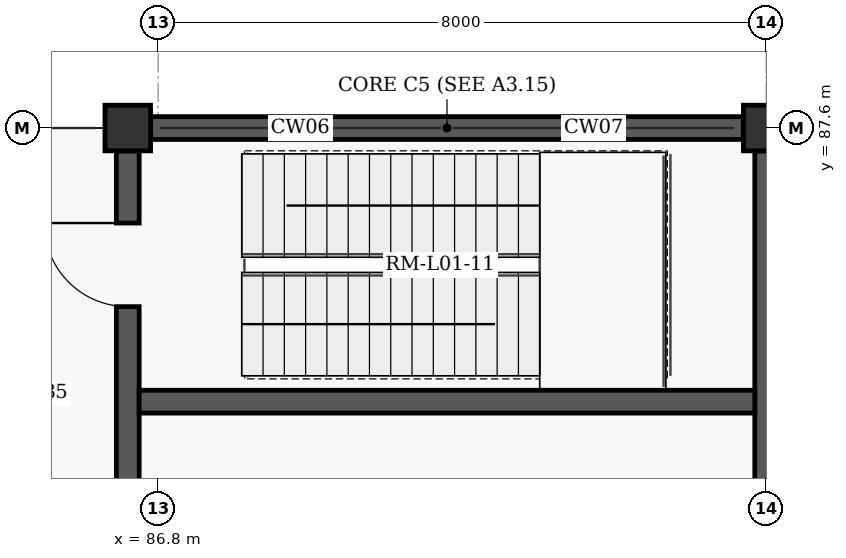
"""IFC4 building model, lengths in metres.
Left out: names, types, materials, properties, quantities, classifications, styles, units other than length and angle.
Written with IfcOpenShell. Run it as: python <this file> out.ifc"""

import sys

from ifc_helpers import new_model, si_unit, direction, frame, frame_2d, origin, origin_2d, place, context, subcontext, project, spatial, rectangle, extrude, element, fill, save


model = new_model("IFC4")
c1 = context("Model", 3, precision=1e-05, world=origin(), true_north=direction((0.0, 1.0)))
c2 = subcontext(c1, "Body", "Model", "MODEL_VIEW")
j1 = project(units=[si_unit("LENGTHUNIT", "METRE"), si_unit("PLANEANGLEUNIT", "RADIAN")], contexts=[c1])
p1 = place(None, origin())
s1 = spatial("IfcSite", under=j1, at=p1, CompositionType="ELEMENT")
p2 = place(p1, origin())
s2 = spatial("IfcBuilding", under=s1, at=p2, CompositionType="ELEMENT")
p3 = place(p2, frame((0.0, 0.0, 5.4)))
s3 = spatial("IfcBuildingStorey", under=s2, at=p3, CompositionType="ELEMENT", Elevation=5.4)
for number, where, z_axis, x_axis in (
    (1, (86.4, 87.6, 0.0), (0.0, 0.0, 1.0), (1.0, 0.0, 0.0)),
    (2, (94.8, 87.6, 0.0), (0.0, 0.0, 1.0), (1.0, 0.0, 0.0)),
):
    element("IfcColumn", number, at=place(p3, frame(where, z_axis=z_axis, x_axis=x_axis)), inside=s3, PredefinedType="COLUMN", context=c2, shape_type="SweptSolid", body=[
        extrude(rectangle(XDim=0.6, YDim=0.6, at=origin_2d()), origin(), (0.0, 0.0, 1.0), 4.8),
    ])
p4 = place(p3, frame((86.702, 87.6, 0.0), z_axis=(0.0, 0.0, 1.0), x_axis=(1.0, 0.0, 0.0)))
e3 = element("IfcWall", 3, at=p4, inside=s3, PredefinedType="SHEAR", context=c2, shape_type="SweptSolid", body=[
    extrude(rectangle(XDim=7.796, YDim=0.3, at=frame_2d((3.898, 0.0))), origin(), (0.0, 0.0, 1.0), 4.54),
])
p5 = place(p3, frame((86.4, 79.902, 0.0), z_axis=(0.0, 0.0, 1.0), x_axis=(0.0, 1.0, 0.0)))
e4 = element("IfcWall", 4, at=p5, inside=s3, PredefinedType="SHEAR", context=c2, shape_type="SweptSolid", body=[
    extrude(rectangle(XDim=7.396, YDim=0.3, at=frame_2d((3.698, 0.0))), origin(), (0.0, 0.0, 1.0), 4.54),
])
p6 = place(p5, frame((5.348, 0.0, 0.0)))
e5 = element("IfcOpeningElement", 5, at=p6, cuts=e4, PredefinedType="OPENING", context=c2, shape_type="SweptSolid", body=[
    extrude(rectangle(XDim=1.1, YDim=2.15, at=frame_2d((0.55, 1.075))), frame((0.0, 0.16, 0.0), z_axis=(0.0, -1.0, 0.0), x_axis=(1.0, 0.0, 0.0)), (0.0, 0.0, 1.0), 0.32),
])
p7 = place(p5, frame((1.323, 0.0, 0.0)))
e6 = element("IfcOpeningElement", 6, at=p7, cuts=e4, PredefinedType="OPENING", context=c2, shape_type="SweptSolid", body=[
    extrude(rectangle(XDim=1.15, YDim=2.2, at=frame_2d((0.575, 1.1))), frame((0.0, 0.16, 0.0), z_axis=(0.0, -1.0, 0.0), x_axis=(1.0, 0.0, 0.0)), (0.0, 0.0, 1.0), 0.32),
])
p8 = place(p3, frame((94.8, 79.902, 0.0), z_axis=(0.0, 0.0, 1.0), x_axis=(0.0, 1.0, 0.0)))
e7 = element("IfcWall", 7, at=p8, inside=s3, PredefinedType="SHEAR", context=c2, shape_type="SweptSolid", body=[
    extrude(rectangle(XDim=7.396, YDim=0.3, at=frame_2d((3.698, 0.0))), origin(), (0.0, 0.0, 1.0), 4.54),
])
p9 = place(p3, frame((86.55, 84.0, 0.0), z_axis=(0.0, 0.0, 1.0), x_axis=(1.0, 0.0, 0.0)))
e8 = element("IfcWall", 8, at=p9, inside=s3, PredefinedType="SHEAR", context=c2, shape_type="SweptSolid", body=[
    extrude(rectangle(XDim=8.1, YDim=0.3, at=frame_2d((4.05, 0.0))), origin(), (0.0, 0.0, 1.0), 4.54),
])
p10 = place(p6, origin())
e9 = element("IfcDoor", 9, at=p10, inside=s3, OperationType="SINGLE_SWING_RIGHT", PredefinedType="DOOR", context=c2, shape_type="SweptSolid", body=[
    extrude(rectangle(XDim=1.1, YDim=2.15, at=frame_2d((0.55, 1.075))), frame((0.0, 0.025, 0.0), z_axis=(0.0, -1.0, 0.0), x_axis=(1.0, 0.0, 0.0)), (0.0, 0.0, 1.0), 0.05),
])
fill(e5, e9)
save(model, sys.argv[1])
